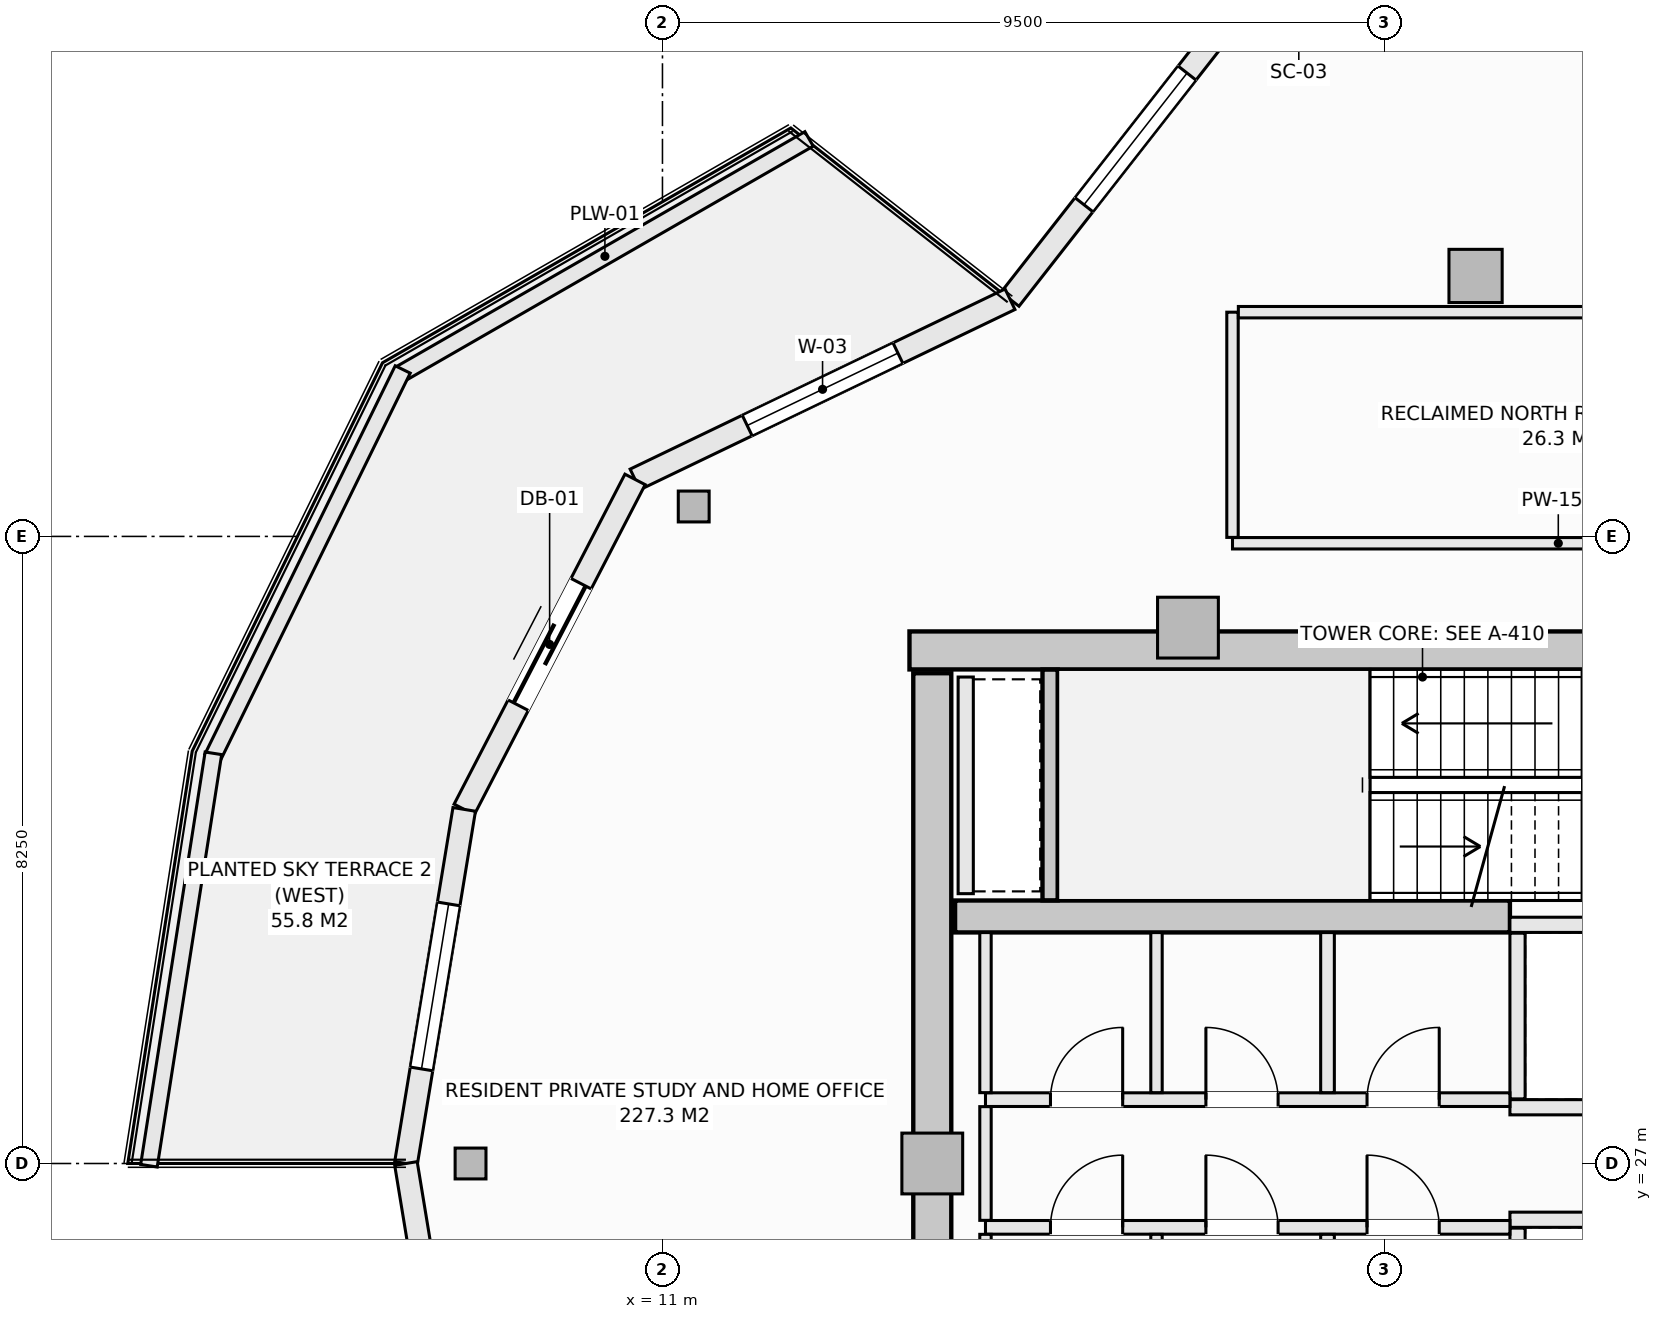
"""IFC4 building model, lengths in metres.
Left out: names, types, materials, properties, quantities, classifications, styles, units other than length and angle.
Written with IfcOpenShell. Run it as: python <this file> out.ifc"""

import sys

from ifc_helpers import new_model, si_unit, direction, frame, frame_2d, origin, origin_2d, place, context, subcontext, project, spatial, rectangle, hollow_rectangle, extrude, element, fill, save


model = new_model("IFC4")
c1 = context("Model", 3, precision=1e-05, world=origin(), true_north=direction((0.0, 1.0)))
c2 = subcontext(c1, "Body", "Model", "MODEL_VIEW")
j1 = project(units=[si_unit("LENGTHUNIT", "METRE"), si_unit("PLANEANGLEUNIT", "RADIAN")], contexts=[c1])
p1 = place(None, origin())
s1 = spatial("IfcSite", under=j1, at=p1, CompositionType="ELEMENT")
p2 = place(p1, origin())
s2 = spatial("IfcBuilding", under=s1, at=p2, CompositionType="ELEMENT")
p3 = place(p2, frame((0.0, 0.0, 242.6)))
s3 = spatial("IfcBuildingStorey", under=s2, at=p3, CompositionType="ELEMENT", Elevation=242.6)
p4 = place(p3, frame((14.25, 33.75, -0.27), z_axis=(0.0, 0.0, 1.0), x_axis=(1.0, 0.0, 0.0)))
e1 = element("IfcWall", 1, at=p4, inside=s3, PredefinedType="SHEAR", context=c2, shape_type="SweptSolid", body=[
    extrude(rectangle(XDim=13.5, YDim=0.5, at=frame_2d((6.75, 0.0))), origin(), (0.0, 0.0, 1.0), 3.3),
])
p5 = place(p3, frame((14.55, 20.55, -0.27), z_axis=(0.0, 0.0, 1.0), x_axis=(0.0, 1.0, 0.0)))
e2 = element("IfcWall", 2, at=p5, inside=s3, PredefinedType="SHEAR", context=c2, shape_type="SweptSolid", body=[
    extrude(rectangle(XDim=12.9, YDim=0.5, at=frame_2d((6.45, 0.0))), origin(), (0.0, 0.0, 1.0), 3.3),
])
p6 = place(p3, frame((14.85, 30.25, -0.27), z_axis=(0.0, 0.0, 1.0), x_axis=(1.0, 0.0, 0.0)))
e3 = element("IfcWall", 3, at=p6, inside=s3, PredefinedType="SHEAR", context=c2, shape_type="SweptSolid", body=[
    extrude(rectangle(XDim=7.3, YDim=0.42, at=frame_2d((3.65, 0.0))), origin(), (0.0, 0.0, 1.0), 3.3),
])
for number, where, z_axis, x_axis in (
    (4, (11.411, 35.644, -0.27), (0.0, 0.0, 1.0), (1.0, 0.0, 0.0)),
    (5, (8.475, 27.0, -0.27), (0.0, 0.0, 1.0), (1.0, 0.0, 0.0)),
):
    element("IfcColumn", number, at=place(p3, frame(where, z_axis=z_axis, x_axis=x_axis)), inside=s3, PredefinedType="COLUMN", context=c2, shape_type="SweptSolid", body=[
        extrude(hollow_rectangle(XDim=0.406, YDim=0.406, WallThickness=0.016, at=origin_2d()), origin(), (0.0, 0.0, 1.0), 3.3),
    ])
p7 = place(p3, frame((21.698, 38.677, -0.27), z_axis=(0.0, 0.0, 1.0), x_axis=(1.0, 0.0, 0.0)))
e6 = element("IfcColumn", 6, at=p7, inside=s3, PredefinedType="COLUMN", context=c2, shape_type="SweptSolid", body=[
    extrude(rectangle(XDim=0.7, YDim=0.7, at=origin_2d()), origin(), (0.0, 0.0, 1.0), 3.3),
])
for number, where, z_axis, x_axis in (
    (7, (17.914, 34.05, -0.27), (0.0, 0.0, 1.0), (1.0, 0.0, 0.0)),
    (8, (14.55, 27.0, -0.27), (0.0, 0.0, 1.0), (1.0, 0.0, 0.0)),
):
    element("IfcColumn", number, at=place(p3, frame(where, z_axis=z_axis, x_axis=x_axis)), inside=s3, PredefinedType="PILASTER", context=c2, shape_type="SweptSolid", body=[
        extrude(rectangle(XDim=0.8, YDim=0.8, at=origin_2d()), origin(), (0.0, 0.0, 1.0), 3.3),
    ])
p8 = place(p3, frame((15.573, 38.37, 0.0), z_axis=(0.0, 0.0, 1.0), x_axis=(0.61644588519, 0.787397276241, 0.0)))
e9 = element("IfcWall", 9, at=p8, inside=s3, PredefinedType="SOLIDWALL", context=c2, shape_type="SweptSolid", body=[
    extrude(rectangle(XDim=5.357, YDim=0.3, at=frame_2d((2.678, 0.0))), origin(), (0.0, 0.0, 1.0), 2.605),
])
p9 = place(p8, frame((1.579, 0.0, 0.72)))
e10 = element("IfcOpeningElement", 10, at=p9, cuts=e9, PredefinedType="OPENING", context=c2, shape_type="SweptSolid", body=[
    extrude(rectangle(XDim=2.2, YDim=1.65, at=frame_2d((1.1, 0.825))), frame((0.0, 0.16, 0.0), z_axis=(0.0, -1.0, 0.0), x_axis=(1.0, 0.0, 0.0)), (0.0, 0.0, 1.0), 0.32),
])
p10 = place(p3, frame((10.639, 36.0, 0.0), z_axis=(0.0, 0.0, 1.0), x_axis=(0.901355238351, 0.433080517106, 0.0)))
e11 = element("IfcWall", 11, at=p10, inside=s3, PredefinedType="SOLIDWALL", context=c2, shape_type="SweptSolid", body=[
    extrude(rectangle(XDim=5.473, YDim=0.3, at=frame_2d((2.737, 0.0))), origin(), (0.0, 0.0, 1.0), 2.605),
])
p11 = place(p10, frame((1.637, 0.0, 0.72)))
e12 = element("IfcOpeningElement", 12, at=p11, cuts=e11, PredefinedType="OPENING", context=c2, shape_type="SweptSolid", body=[
    extrude(rectangle(XDim=2.2, YDim=1.65, at=frame_2d((1.1, 0.825))), frame((0.0, 0.16, 0.0), z_axis=(0.0, -1.0, 0.0), x_axis=(1.0, 0.0, 0.0)), (0.0, 0.0, 1.0), 0.32),
])
p12 = place(p3, frame((8.392, 31.659, 0.0), z_axis=(0.0, 0.0, 1.0), x_axis=(0.459793771602, 0.888025724625, 0.0)))
e13 = element("IfcWall", 13, at=p12, inside=s3, PredefinedType="SOLIDWALL", context=c2, shape_type="SweptSolid", body=[
    extrude(rectangle(XDim=4.889, YDim=0.3, at=frame_2d((2.444, 0.0))), origin(), (0.0, 0.0, 1.0), 2.605),
])
p13 = place(p12, frame((1.544, 0.0, 0.0)))
e14 = element("IfcOpeningElement", 14, at=p13, cuts=e13, PredefinedType="OPENING", context=c2, shape_type="SweptSolid", body=[
    extrude(rectangle(XDim=1.8, YDim=2.25, at=frame_2d((0.9, 1.125))), frame((0.0, 0.16, 0.0), z_axis=(0.0, -1.0, 0.0), x_axis=(1.0, 0.0, 0.0)), (0.0, 0.0, 1.0), 0.32),
])
p14 = place(p3, frame((7.625, 27.0, 0.0), z_axis=(0.0, 0.0, 1.0), x_axis=(0.162369371657, 0.986730047758, 0.0)))
e15 = element("IfcWall", 15, at=p14, inside=s3, PredefinedType="SOLIDWALL", context=c2, shape_type="SweptSolid", body=[
    extrude(rectangle(XDim=4.721, YDim=0.3, at=frame_2d((2.361, 0.0))), origin(), (0.0, 0.0, 1.0), 2.605),
])
p15 = place(p14, frame((1.261, 0.0, 0.72)))
e16 = element("IfcOpeningElement", 16, at=p15, cuts=e15, PredefinedType="OPENING", context=c2, shape_type="SweptSolid", body=[
    extrude(rectangle(XDim=2.2, YDim=1.65, at=frame_2d((1.1, 0.825))), frame((0.0, 0.16, 0.0), z_axis=(0.0, -1.0, 0.0), x_axis=(1.0, 0.0, 0.0)), (0.0, 0.0, 1.0), 0.32),
])
p16 = place(p3, frame((7.625, 27.0, 0.0), z_axis=(0.0, 0.0, 1.0), x_axis=(0.162369371657, -0.986730047758, 0.0)))
e17 = element("IfcWall", 17, at=p16, inside=s3, PredefinedType="SOLIDWALL", context=c2, shape_type="SweptSolid", body=[
    extrude(rectangle(XDim=4.721, YDim=0.3, at=frame_2d((2.361, 0.0))), origin(), (0.0, 0.0, 1.0), 2.605),
])
p17 = place(p16, frame((1.261, 0.0, 0.72)))
e18 = element("IfcOpeningElement", 18, at=p17, cuts=e17, PredefinedType="OPENING", context=c2, shape_type="SweptSolid", body=[
    extrude(rectangle(XDim=2.2, YDim=1.65, at=frame_2d((1.1, 0.825))), frame((0.0, 0.16, 0.0), z_axis=(0.0, -1.0, 0.0), x_axis=(1.0, 0.0, 0.0)), (0.0, 0.0, 1.0), 0.32),
])
p18 = place(p3, frame((7.557, 37.391, 0.0), z_axis=(0.0, 0.0, 1.0), x_axis=(0.866901621005, 0.49847926687, 0.0)))
e19 = element("IfcWall", 19, at=p18, inside=s3, PredefinedType="PARAPET", context=c2, shape_type="SweptSolid", body=[
    extrude(rectangle(XDim=6.197, YDim=0.22, at=frame_2d((3.098, 0.0))), origin(), (0.0, 0.0, 1.0), 0.52),
])
p19 = place(p3, frame((5.079, 32.338, 0.0), z_axis=(0.0, 0.0, 1.0), x_axis=(0.440058847499, 0.897968936399, 0.0)))
e20 = element("IfcWall", 20, at=p19, inside=s3, PredefinedType="PARAPET", context=c2, shape_type="SweptSolid", body=[
    extrude(rectangle(XDim=5.689, YDim=0.22, at=frame_2d((2.845, 0.0))), origin(), (0.0, 0.0, 1.0), 0.52),
])
p20 = place(p3, frame((4.243, 26.971, 0.0), z_axis=(0.0, 0.0, 1.0), x_axis=(0.154441975483, 0.988001860428, 0.0)))
e21 = element("IfcWall", 21, at=p20, inside=s3, PredefinedType="PARAPET", context=c2, shape_type="SweptSolid", body=[
    extrude(rectangle(XDim=5.492, YDim=0.22, at=frame_2d((2.746, 0.0))), origin(), (0.0, 0.0, 1.0), 0.52),
])
p21 = place(p3, frame((16.1, 30.462, -0.27), z_axis=(0.0, 0.0, 1.0), x_axis=(0.0, 1.0, 0.0)))
e22 = element("IfcWall", 22, at=p21, inside=s3, PredefinedType="SHEAR", context=c2, shape_type="SweptSolid", body=[
    extrude(rectangle(XDim=3.036, YDim=0.2, at=frame_2d((1.518, 0.0))), origin(), (0.0, 0.0, 1.0), 3.3),
])
for number, where, z_axis, x_axis in (
    (23, (22.15, 30.14, 0.0), (0.0, 0.0, 1.0), (1.0, 0.0, 0.0)),
    (24, (22.15, 27.74, 0.0), (0.0, 0.0, 1.0), (1.0, 0.0, 0.0)),
):
    element("IfcWall", number, at=place(p3, frame(where, z_axis=z_axis, x_axis=x_axis)), inside=s3, PredefinedType="SOLIDWALL", context=c2, shape_type="SweptSolid", body=[
        extrude(rectangle(XDim=2.45, YDim=0.2, at=frame_2d((1.225, 0.0))), origin(), (0.0, 0.0, 1.0), 3.03),
    ])
p22 = place(p3, frame((22.25, 27.85, 0.0), z_axis=(0.0, 0.0, 1.0), x_axis=(0.0, 1.0, 0.0)))
e25 = element("IfcWall", 25, at=p22, inside=s3, PredefinedType="SOLIDWALL", context=c2, shape_type="SweptSolid", body=[
    extrude(rectangle(XDim=2.18, YDim=0.2, at=frame_2d((1.09, 0.0))), origin(), (0.0, 0.0, 1.0), 3.03),
])
p23 = place(p3, frame((22.15, 26.26, 0.0), z_axis=(0.0, 0.0, 1.0), x_axis=(1.0, 0.0, 0.0)))
e26 = element("IfcWall", 26, at=p23, inside=s3, PredefinedType="SOLIDWALL", context=c2, shape_type="SweptSolid", body=[
    extrude(rectangle(XDim=2.45, YDim=0.2, at=frame_2d((1.225, 0.0))), origin(), (0.0, 0.0, 1.0), 3.03),
])
p24 = place(p3, frame((22.25, 23.97, 0.0), z_axis=(0.0, 0.0, 1.0), x_axis=(0.0, 1.0, 0.0)))
e27 = element("IfcWall", 27, at=p24, inside=s3, PredefinedType="SOLIDWALL", context=c2, shape_type="SweptSolid", body=[
    extrude(rectangle(XDim=2.18, YDim=0.2, at=frame_2d((1.09, 0.0))), origin(), (0.0, 0.0, 1.0), 3.03),
])
p25 = place(p3, frame((14.99, 30.55, 0.0), z_axis=(0.0, 0.0, 1.0), x_axis=(0.0, 1.0, 0.0)))
e28 = element("IfcWall", 28, at=p25, inside=s3, PredefinedType="SOLIDWALL", context=c2, shape_type="SweptSolid", body=[
    extrude(rectangle(XDim=2.85, YDim=0.2, at=frame_2d((1.425, 0.0))), origin(), (0.0, 0.0, 1.0), 3.03),
])
p26 = place(p3, frame((15.25, 27.84, 0.0), z_axis=(0.0, 0.0, 1.0), x_axis=(1.0, 0.0, 0.0)))
e29 = element("IfcWall", 29, at=p26, inside=s3, PredefinedType="SOLIDWALL", context=c2, shape_type="SweptSolid", body=[
    extrude(rectangle(XDim=6.9, YDim=0.18, at=frame_2d((3.45, 0.0))), origin(), (0.0, 0.0, 1.0), 3.03),
])
p27 = place(p26, frame((5.02, 0.0, 0.0)))
e30 = element("IfcOpeningElement", 30, at=p27, cuts=e29, PredefinedType="OPENING", context=c2, shape_type="SweptSolid", body=[
    extrude(rectangle(XDim=0.95, YDim=2.1, at=frame_2d((0.475, 1.05))), frame((0.0, 0.1, 0.0), z_axis=(0.0, -1.0, 0.0), x_axis=(1.0, 0.0, 0.0)), (0.0, 0.0, 1.0), 0.2),
])
p28 = place(p26, frame((0.855, 0.0, 0.0)))
e31 = element("IfcOpeningElement", 31, at=p28, cuts=e29, PredefinedType="OPENING", context=c2, shape_type="SweptSolid", body=[
    extrude(rectangle(XDim=0.95, YDim=2.1, at=frame_2d((0.475, 1.05))), frame((0.0, 0.1, 0.0), z_axis=(0.0, -1.0, 0.0), x_axis=(1.0, 0.0, 0.0)), (0.0, 0.0, 1.0), 0.2),
])
p29 = place(p26, frame((2.9, 0.0, 0.0)))
e32 = element("IfcOpeningElement", 32, at=p29, cuts=e29, PredefinedType="OPENING", context=c2, shape_type="SweptSolid", body=[
    extrude(rectangle(XDim=0.95, YDim=2.1, at=frame_2d((0.475, 1.05))), frame((0.0, 0.1, 0.0), z_axis=(0.0, -1.0, 0.0), x_axis=(1.0, 0.0, 0.0)), (0.0, 0.0, 1.0), 0.2),
])
p30 = place(p3, frame((15.25, 26.16, 0.0), z_axis=(0.0, 0.0, 1.0), x_axis=(1.0, 0.0, 0.0)))
e33 = element("IfcWall", 33, at=p30, inside=s3, PredefinedType="SOLIDWALL", context=c2, shape_type="SweptSolid", body=[
    extrude(rectangle(XDim=6.9, YDim=0.18, at=frame_2d((3.45, 0.0))), origin(), (0.0, 0.0, 1.0), 3.03),
])
p31 = place(p30, frame((5.02, 0.0, 0.0)))
e34 = element("IfcOpeningElement", 34, at=p31, cuts=e33, PredefinedType="OPENING", context=c2, shape_type="SweptSolid", body=[
    extrude(rectangle(XDim=0.95, YDim=2.1, at=frame_2d((0.475, 1.05))), frame((0.0, 0.1, 0.0), z_axis=(0.0, -1.0, 0.0), x_axis=(1.0, 0.0, 0.0)), (0.0, 0.0, 1.0), 0.2),
])
p32 = place(p30, frame((0.855, 0.0, 0.0)))
e35 = element("IfcOpeningElement", 35, at=p32, cuts=e33, PredefinedType="OPENING", context=c2, shape_type="SweptSolid", body=[
    extrude(rectangle(XDim=0.95, YDim=2.1, at=frame_2d((0.475, 1.05))), frame((0.0, 0.1, 0.0), z_axis=(0.0, -1.0, 0.0), x_axis=(1.0, 0.0, 0.0)), (0.0, 0.0, 1.0), 0.2),
])
p33 = place(p30, frame((2.9, 0.0, 0.0)))
e36 = element("IfcOpeningElement", 36, at=p33, cuts=e33, PredefinedType="OPENING", context=c2, shape_type="SweptSolid", body=[
    extrude(rectangle(XDim=0.95, YDim=2.1, at=frame_2d((0.475, 1.05))), frame((0.0, 0.1, 0.0), z_axis=(0.0, -1.0, 0.0), x_axis=(1.0, 0.0, 0.0)), (0.0, 0.0, 1.0), 0.2),
])
p34 = place(p3, frame((15.25, 23.962, 0.0), z_axis=(0.0, 0.0, 1.0), x_axis=(0.0, 1.0, 0.0)))
e37 = element("IfcWall", 37, at=p34, inside=s3, PredefinedType="PARTITIONING", context=c2, shape_type="SweptSolid", body=[
    extrude(rectangle(XDim=2.106, YDim=0.15, at=frame_2d((1.053, 0.0))), origin(), (0.0, 0.0, 1.0), 3.03),
])
p35 = place(p3, frame((15.25, 26.252, 0.0), z_axis=(0.0, 0.0, 1.0), x_axis=(0.0, 1.0, 0.0)))
e38 = element("IfcWall", 38, at=p35, inside=s3, PredefinedType="PARTITIONING", context=c2, shape_type="SweptSolid", body=[
    extrude(rectangle(XDim=1.496, YDim=0.15, at=frame_2d((0.748, 0.0))), origin(), (0.0, 0.0, 1.0), 3.03),
])
p36 = place(p3, frame((15.25, 27.932, 0.0), z_axis=(0.0, 0.0, 1.0), x_axis=(0.0, 1.0, 0.0)))
e39 = element("IfcWall", 39, at=p36, inside=s3, PredefinedType="PARTITIONING", context=c2, shape_type="SweptSolid", body=[
    extrude(rectangle(XDim=2.106, YDim=0.15, at=frame_2d((1.053, 0.0))), origin(), (0.0, 0.0, 1.0), 3.03),
])
for number, where, z_axis, x_axis in (
    (40, (19.75, 23.962, 0.0), (0.0, 0.0, 1.0), (0.0, 1.0, 0.0)),
    (41, (19.75, 27.932, 0.0), (0.0, 0.0, 1.0), (0.0, 1.0, 0.0)),
):
    element("IfcWall", number, at=place(p3, frame(where, z_axis=z_axis, x_axis=x_axis)), inside=s3, PredefinedType="SOLIDWALL", context=c2, shape_type="SweptSolid", body=[
        extrude(rectangle(XDim=2.106, YDim=0.18, at=frame_2d((1.053, 0.0))), origin(), (0.0, 0.0, 1.0), 3.03),
    ])
for number, where, z_axis, x_axis in (
    (42, (17.5, 23.962, 0.0), (0.0, 0.0, 1.0), (0.0, 1.0, 0.0)),
    (43, (17.5, 27.932, 0.0), (0.0, 0.0, 1.0), (0.0, 1.0, 0.0)),
):
    element("IfcWall", number, at=place(p3, frame(where, z_axis=z_axis, x_axis=x_axis)), inside=s3, PredefinedType="PARTITIONING", context=c2, shape_type="SweptSolid", body=[
        extrude(rectangle(XDim=2.106, YDim=0.15, at=frame_2d((1.053, 0.0))), origin(), (0.0, 0.0, 1.0), 3.03),
    ])
p37 = place(p3, frame((18.5, 35.16, 0.0), z_axis=(0.0, 0.0, 1.0), x_axis=(1.0, 0.0, 0.0)))
e44 = element("IfcWall", 44, at=p37, inside=s3, PredefinedType="PARTITIONING", context=c2, shape_type="SweptSolid", body=[
    extrude(rectangle(XDim=8.573, YDim=0.15, at=frame_2d((4.287, 0.0))), origin(), (0.0, 0.0, 1.0), 3.03),
])
p38 = place(p3, frame((18.5, 35.237, 0.0), z_axis=(0.0, 0.0, 1.0), x_axis=(0.0, 1.0, 0.0)))
e45 = element("IfcWall", 45, at=p38, inside=s3, PredefinedType="PARTITIONING", context=c2, shape_type="SweptSolid", body=[
    extrude(rectangle(XDim=2.963, YDim=0.15, at=frame_2d((1.481, 0.0))), origin(), (0.0, 0.0, 1.0), 3.03),
])
p39 = place(p3, frame((18.577, 38.2, 0.0), z_axis=(0.0, 0.0, 1.0), x_axis=(1.0, 0.0, 0.0)))
e46 = element("IfcWall", 46, at=p39, inside=s3, PredefinedType="PARTITIONING", context=c2, shape_type="SweptSolid", body=[
    extrude(rectangle(XDim=8.496, YDim=0.15, at=frame_2d((4.248, 0.0))), origin(), (0.0, 0.0, 1.0), 3.03),
])
p40 = place(p9, origin())
e47 = element("IfcWindow", 47, at=p40, inside=s3, PartitioningType="SINGLE_PANEL", PredefinedType="WINDOW", context=c2, shape_type="SweptSolid", body=[
    extrude(rectangle(XDim=2.2, YDim=1.65, at=frame_2d((1.1, 0.825))), frame((0.0, 0.03, 0.0), z_axis=(0.0, -1.0, 0.0), x_axis=(1.0, 0.0, 0.0)), (0.0, 0.0, 1.0), 0.06),
])
fill(e10, e47)
p41 = place(p11, origin())
e48 = element("IfcWindow", 48, at=p41, inside=s3, PartitioningType="SINGLE_PANEL", PredefinedType="WINDOW", context=c2, shape_type="SweptSolid", body=[
    extrude(rectangle(XDim=2.2, YDim=1.65, at=frame_2d((1.1, 0.825))), frame((0.0, 0.03, 0.0), z_axis=(0.0, -1.0, 0.0), x_axis=(1.0, 0.0, 0.0)), (0.0, 0.0, 1.0), 0.06),
])
fill(e12, e48)
p42 = place(p13, origin())
e49 = element("IfcDoor", 49, at=p42, inside=s3, OperationType="SLIDING_TO_LEFT", PredefinedType="DOOR", context=c2, shape_type="SweptSolid", body=[
    extrude(rectangle(XDim=1.8, YDim=2.25, at=frame_2d((0.9, 1.125))), frame((0.0, 0.025, 0.0), z_axis=(0.0, -1.0, 0.0), x_axis=(1.0, 0.0, 0.0)), (0.0, 0.0, 1.0), 0.05),
])
fill(e14, e49)
p43 = place(p15, origin())
e50 = element("IfcWindow", 50, at=p43, inside=s3, PartitioningType="SINGLE_PANEL", PredefinedType="WINDOW", context=c2, shape_type="SweptSolid", body=[
    extrude(rectangle(XDim=2.2, YDim=1.65, at=frame_2d((1.1, 0.825))), frame((0.0, 0.03, 0.0), z_axis=(0.0, -1.0, 0.0), x_axis=(1.0, 0.0, 0.0)), (0.0, 0.0, 1.0), 0.06),
])
fill(e16, e50)
p44 = place(p27, origin())
e51 = element("IfcDoor", 51, at=p44, inside=s3, OperationType="SINGLE_SWING_RIGHT", PredefinedType="DOOR", context=c2, shape_type="SweptSolid", body=[
    extrude(rectangle(XDim=0.95, YDim=2.1, at=frame_2d((0.475, 1.05))), frame((0.0, 0.025, 0.0), z_axis=(0.0, -1.0, 0.0), x_axis=(1.0, 0.0, 0.0)), (0.0, 0.0, 1.0), 0.05),
])
fill(e30, e51)
p45 = place(p31, origin())
e52 = element("IfcDoor", 52, at=p45, inside=s3, OperationType="SINGLE_SWING_LEFT", PredefinedType="DOOR", context=c2, shape_type="SweptSolid", body=[
    extrude(rectangle(XDim=0.95, YDim=2.1, at=frame_2d((0.475, 1.05))), frame((0.0, 0.025, 0.0), z_axis=(0.0, -1.0, 0.0), x_axis=(1.0, 0.0, 0.0)), (0.0, 0.0, 1.0), 0.05),
])
fill(e34, e52)
p46 = place(p28, origin())
e53 = element("IfcDoor", 53, at=p46, inside=s3, OperationType="SINGLE_SWING_RIGHT", PredefinedType="DOOR", context=c2, shape_type="SweptSolid", body=[
    extrude(rectangle(XDim=0.95, YDim=2.1, at=frame_2d((0.475, 1.05))), frame((0.0, 0.025, 0.0), z_axis=(0.0, -1.0, 0.0), x_axis=(1.0, 0.0, 0.0)), (0.0, 0.0, 1.0), 0.05),
])
fill(e31, e53)
p47 = place(p29, origin())
e54 = element("IfcDoor", 54, at=p47, inside=s3, OperationType="SINGLE_SWING_LEFT", PredefinedType="DOOR", context=c2, shape_type="SweptSolid", body=[
    extrude(rectangle(XDim=0.95, YDim=2.1, at=frame_2d((0.475, 1.05))), frame((0.0, 0.025, 0.0), z_axis=(0.0, -1.0, 0.0), x_axis=(1.0, 0.0, 0.0)), (0.0, 0.0, 1.0), 0.05),
])
fill(e32, e54)
p48 = place(p32, origin())
e55 = element("IfcDoor", 55, at=p48, inside=s3, OperationType="SINGLE_SWING_RIGHT", PredefinedType="DOOR", context=c2, shape_type="SweptSolid", body=[
    extrude(rectangle(XDim=0.95, YDim=2.1, at=frame_2d((0.475, 1.05))), frame((0.0, 0.025, 0.0), z_axis=(0.0, -1.0, 0.0), x_axis=(1.0, 0.0, 0.0)), (0.0, 0.0, 1.0), 0.05),
])
fill(e35, e55)
p49 = place(p33, origin())
e56 = element("IfcDoor", 56, at=p49, inside=s3, OperationType="SINGLE_SWING_LEFT", PredefinedType="DOOR", context=c2, shape_type="SweptSolid", body=[
    extrude(rectangle(XDim=0.95, YDim=2.1, at=frame_2d((0.475, 1.05))), frame((0.0, 0.025, 0.0), z_axis=(0.0, -1.0, 0.0), x_axis=(1.0, 0.0, 0.0)), (0.0, 0.0, 1.0), 0.05),
])
fill(e36, e56)
save(model, sys.argv[1])
